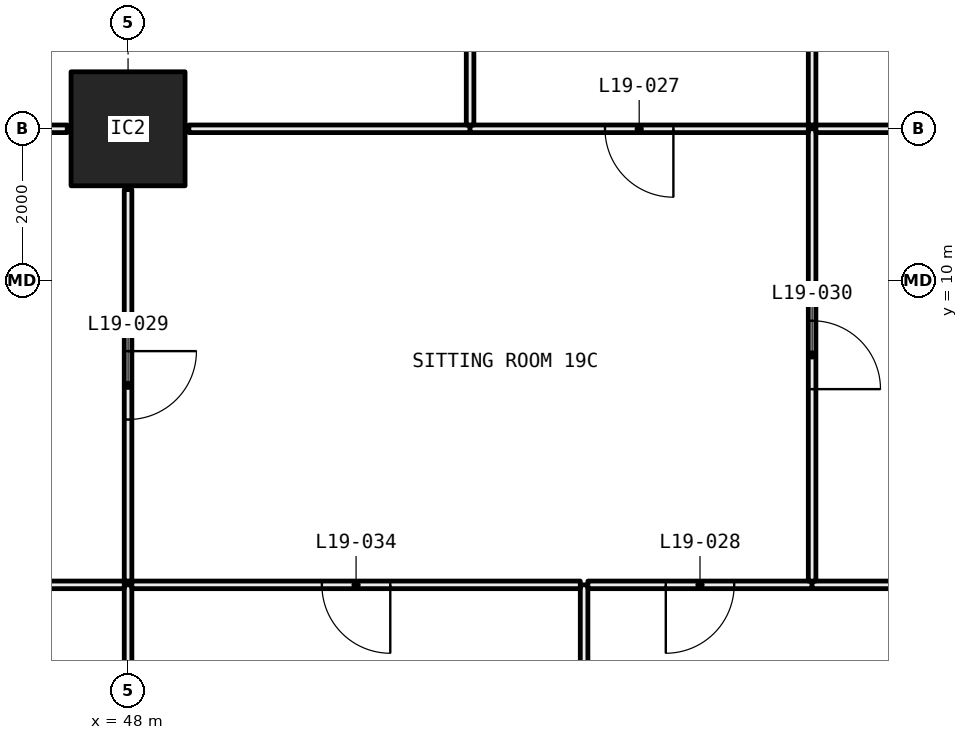
"""IFC4 building model, lengths in metres.
Left out: names, types, materials, properties, quantities, classifications, styles, units other than length and angle.
Written with IfcOpenShell. Run it as: python <this file> out.ifc"""

import sys

from ifc_helpers import new_model, si_unit, direction, frame, frame_2d, origin, origin_2d, place, context, subcontext, project, spatial, rectangle, hollow_rectangle, extrude, element, fill, save


model = new_model("IFC4")
c1 = context("Model", 3, precision=1e-05, world=origin(), true_north=direction((0.0, 1.0)))
c2 = subcontext(c1, "Body", "Model", "MODEL_VIEW")
j1 = project(units=[si_unit("LENGTHUNIT", "METRE"), si_unit("PLANEANGLEUNIT", "RADIAN")], contexts=[c1])
p1 = place(None, origin())
s1 = spatial("IfcSite", under=j1, at=p1, CompositionType="ELEMENT")
p2 = place(p1, origin())
s2 = spatial("IfcBuilding", under=s1, at=p2, CompositionType="ELEMENT")
p3 = place(p2, frame((0.0, 0.0, 78.3)))
s3 = spatial("IfcBuildingStorey", under=s2, at=p3, CompositionType="ELEMENT", Elevation=78.3)
p4 = place(p3, frame((48.0, 12.0, 0.0), z_axis=(0.0, 0.0, 1.0), x_axis=(1.0, 0.0, 0.0)))
e1 = element("IfcColumn", 1, at=p4, inside=s3, PredefinedType="COLUMN", context=c2, shape_type="SweptSolid", body=[
    extrude(hollow_rectangle(XDim=1.5, YDim=1.5, WallThickness=0.065, at=origin_2d()), origin(), (0.0, 0.0, 1.0), 3.05),
])
p5 = place(p3, frame((48.0, 0.72, 0.0), z_axis=(0.0, 0.0, 1.0), x_axis=(0.0, 1.0, 0.0)))
e2 = element("IfcWall", 2, at=p5, inside=s3, PredefinedType="PARTITIONING", context=c2, shape_type="SweptSolid", body=[
    extrude(rectangle(XDim=5.28, YDim=0.1, at=frame_2d((2.64, 0.0))), origin(), (0.0, 0.0, 1.0), 2.45),
])
p6 = place(p3, frame((47.95, 6.0, 0.0), z_axis=(0.0, 0.0, 1.0), x_axis=(-1.0, 0.0, 0.0)))
e3 = element("IfcWall", 3, at=p6, inside=s3, PredefinedType="PARTITIONING", context=c2, shape_type="SweptSolid", body=[
    extrude(rectangle(XDim=8.875, YDim=0.1, at=frame_2d((4.438, 0.0))), origin(), (0.0, 0.0, 1.0), 2.45),
])
p7 = place(p6, frame((3.988, 0.0, 0.0)))
e4 = element("IfcOpeningElement", 4, at=p7, cuts=e3, PredefinedType="OPENING", context=c2, shape_type="SweptSolid", body=[
    extrude(rectangle(XDim=0.9, YDim=2.1, at=frame_2d((0.45, 1.05))), frame((0.0, 0.06, 0.0), z_axis=(0.0, -1.0, 0.0), x_axis=(1.0, 0.0, 0.0)), (0.0, 0.0, 1.0), 0.12),
])
p8 = place(p3, frame((54.0, 0.72, 0.0), z_axis=(0.0, 0.0, 1.0), x_axis=(0.0, 1.0, 0.0)))
e5 = element("IfcWall", 5, at=p8, inside=s3, PredefinedType="PARTITIONING", context=c2, shape_type="SweptSolid", body=[
    extrude(rectangle(XDim=5.28, YDim=0.1, at=frame_2d((2.64, 0.0))), origin(), (0.0, 0.0, 1.0), 3.05),
])
p9 = place(p3, frame((53.95, 6.0, 0.0), z_axis=(0.0, 0.0, 1.0), x_axis=(-1.0, 0.0, 0.0)))
e6 = element("IfcWall", 6, at=p9, inside=s3, PredefinedType="PARTITIONING", context=c2, shape_type="SweptSolid", body=[
    extrude(rectangle(XDim=5.9, YDim=0.1, at=frame_2d((2.95, 0.0))), origin(), (0.0, 0.0, 1.0), 2.45),
])
p10 = place(p9, frame((2.5, 0.0, 0.0)))
e7 = element("IfcOpeningElement", 7, at=p10, cuts=e6, PredefinedType="OPENING", context=c2, shape_type="SweptSolid", body=[
    extrude(rectangle(XDim=0.9, YDim=2.1, at=frame_2d((0.45, 1.05))), frame((0.0, 0.06, 0.0), z_axis=(0.0, -1.0, 0.0), x_axis=(1.0, 0.0, 0.0)), (0.0, 0.0, 1.0), 0.12),
])
p11 = place(p3, frame((57.0, 6.0, 0.0), z_axis=(0.0, 0.0, 1.0), x_axis=(-1.0, 0.0, 0.0)))
e8 = element("IfcWall", 8, at=p11, inside=s3, PredefinedType="PARTITIONING", context=c2, shape_type="SweptSolid", body=[
    extrude(rectangle(XDim=2.95, YDim=0.1, at=frame_2d((1.475, 0.0))), origin(), (0.0, 0.0, 1.0), 3.05),
])
p12 = place(p11, frame((1.025, 0.0, 0.0)))
e9 = element("IfcOpeningElement", 9, at=p12, cuts=e8, PredefinedType="OPENING", context=c2, shape_type="SweptSolid", body=[
    extrude(rectangle(XDim=0.9, YDim=2.1, at=frame_2d((0.45, 1.05))), frame((0.0, 0.06, 0.0), z_axis=(0.0, -1.0, 0.0), x_axis=(1.0, 0.0, 0.0)), (0.0, 0.0, 1.0), 0.12),
])
p13 = place(p3, frame((59.95, 6.0, 0.0), z_axis=(0.0, 0.0, 1.0), x_axis=(-1.0, 0.0, 0.0)))
e10 = element("IfcWall", 10, at=p13, inside=s3, PredefinedType="PARTITIONING", context=c2, shape_type="SweptSolid", body=[
    extrude(rectangle(XDim=2.95, YDim=0.1, at=frame_2d((1.475, 0.0))), origin(), (0.0, 0.0, 1.0), 2.45),
])
p14 = place(p3, frame((48.0, 6.05, 0.0), z_axis=(0.0, 0.0, 1.0), x_axis=(0.0, 1.0, 0.0)))
e11 = element("IfcWall", 11, at=p14, inside=s3, PredefinedType="PARTITIONING", context=c2, shape_type="SweptSolid", body=[
    extrude(rectangle(XDim=5.15, YDim=0.1, at=frame_2d((2.575, 0.0))), origin(), (0.0, 0.0, 1.0), 2.45),
])
p15 = place(p14, frame((2.125, 0.0, 0.0)))
e12 = element("IfcOpeningElement", 12, at=p15, cuts=e11, PredefinedType="OPENING", context=c2, shape_type="SweptSolid", body=[
    extrude(rectangle(XDim=0.9, YDim=2.1, at=frame_2d((0.45, 1.05))), frame((0.0, 0.06, 0.0), z_axis=(0.0, -1.0, 0.0), x_axis=(1.0, 0.0, 0.0)), (0.0, 0.0, 1.0), 0.12),
])
p16 = place(p3, frame((47.2, 12.0, 0.0), z_axis=(0.0, 0.0, 1.0), x_axis=(-1.0, 0.0, 0.0)))
e13 = element("IfcWall", 13, at=p16, inside=s3, PredefinedType="PARTITIONING", context=c2, shape_type="SweptSolid", body=[
    extrude(rectangle(XDim=2.2, YDim=0.1, at=frame_2d((1.1, 0.0))), origin(), (0.0, 0.0, 1.0), 2.45),
])
p17 = place(p3, frame((57.0, 6.05, 0.0), z_axis=(0.0, 0.0, 1.0), x_axis=(0.0, 1.0, 0.0)))
e14 = element("IfcWall", 14, at=p17, inside=s3, PredefinedType="PARTITIONING", context=c2, shape_type="SweptSolid", body=[
    extrude(rectangle(XDim=5.95, YDim=0.1, at=frame_2d((2.975, 0.0))), origin(), (0.0, 0.0, 1.0), 2.45),
])
p18 = place(p17, frame((2.525, 0.0, 0.0)))
e15 = element("IfcOpeningElement", 15, at=p18, cuts=e14, PredefinedType="OPENING", context=c2, shape_type="SweptSolid", body=[
    extrude(rectangle(XDim=0.9, YDim=2.1, at=frame_2d((0.45, 1.05))), frame((0.0, 0.06, 0.0), z_axis=(0.0, -1.0, 0.0), x_axis=(1.0, 0.0, 0.0)), (0.0, 0.0, 1.0), 0.12),
])
p19 = place(p3, frame((52.5, 12.0, 0.0), z_axis=(0.0, 0.0, 1.0), x_axis=(-1.0, 0.0, 0.0)))
e16 = element("IfcWall", 16, at=p19, inside=s3, PredefinedType="PARTITIONING", context=c2, shape_type="SweptSolid", body=[
    extrude(rectangle(XDim=3.7, YDim=0.1, at=frame_2d((1.85, 0.0))), origin(), (0.0, 0.0, 1.0), 2.45),
])
p20 = place(p3, frame((56.95, 12.0, 0.0), z_axis=(0.0, 0.0, 1.0), x_axis=(-1.0, 0.0, 0.0)))
e17 = element("IfcWall", 17, at=p20, inside=s3, PredefinedType="PARTITIONING", context=c2, shape_type="SweptSolid", body=[
    extrude(rectangle(XDim=4.45, YDim=0.1, at=frame_2d((2.225, 0.0))), origin(), (0.0, 0.0, 1.0), 2.45),
])
p21 = place(p20, frame((1.775, 0.0, 0.0)))
e18 = element("IfcOpeningElement", 18, at=p21, cuts=e17, PredefinedType="OPENING", context=c2, shape_type="SweptSolid", body=[
    extrude(rectangle(XDim=0.9, YDim=2.1, at=frame_2d((0.45, 1.05))), frame((0.0, 0.06, 0.0), z_axis=(0.0, -1.0, 0.0), x_axis=(1.0, 0.0, 0.0)), (0.0, 0.0, 1.0), 0.12),
])
p22 = place(p3, frame((59.2, 12.0, 0.0), z_axis=(0.0, 0.0, 1.0), x_axis=(-1.0, 0.0, 0.0)))
e19 = element("IfcWall", 19, at=p22, inside=s3, PredefinedType="PARTITIONING", context=c2, shape_type="SweptSolid", body=[
    extrude(rectangle(XDim=2.15, YDim=0.1, at=frame_2d((1.075, 0.0))), origin(), (0.0, 0.0, 1.0), 2.45),
])
p23 = place(p3, frame((52.5, 12.05, 0.0), z_axis=(0.0, 0.0, 1.0), x_axis=(0.0, 1.0, 0.0)))
e20 = element("IfcWall", 20, at=p23, inside=s3, PredefinedType="PARTITIONING", context=c2, shape_type="SweptSolid", body=[
    extrude(rectangle(XDim=5.85, YDim=0.1, at=frame_2d((2.925, 0.0))), origin(), (0.0, 0.0, 1.0), 2.45),
])
p24 = place(p23, frame((2.475, 0.0, 0.0)))
e21 = element("IfcOpeningElement", 21, at=p24, cuts=e20, PredefinedType="OPENING", context=c2, shape_type="SweptSolid", body=[
    extrude(rectangle(XDim=0.9, YDim=2.1, at=frame_2d((0.45, 1.05))), frame((0.0, 0.06, 0.0), z_axis=(0.0, -1.0, 0.0), x_axis=(1.0, 0.0, 0.0)), (0.0, 0.0, 1.0), 0.12),
])
p25 = place(p3, frame((57.0, 12.05, 0.0), z_axis=(0.0, 0.0, 1.0), x_axis=(0.0, 1.0, 0.0)))
e22 = element("IfcWall", 22, at=p25, inside=s3, PredefinedType="PARTITIONING", context=c2, shape_type="SweptSolid", body=[
    extrude(rectangle(XDim=5.85, YDim=0.1, at=frame_2d((2.925, 0.0))), origin(), (0.0, 0.0, 1.0), 2.45),
])
p26 = place(p25, frame((2.475, 0.0, 0.0)))
e23 = element("IfcOpeningElement", 23, at=p26, cuts=e22, PredefinedType="OPENING", context=c2, shape_type="SweptSolid", body=[
    extrude(rectangle(XDim=0.9, YDim=2.1, at=frame_2d((0.45, 1.05))), frame((0.0, 0.06, 0.0), z_axis=(0.0, -1.0, 0.0), x_axis=(1.0, 0.0, 0.0)), (0.0, 0.0, 1.0), 0.12),
])
p27 = place(p21, origin())
e24 = element("IfcDoor", 24, at=p27, inside=s3, OperationType="SINGLE_SWING_RIGHT", PredefinedType="DOOR", context=c2, shape_type="SweptSolid", body=[
    extrude(rectangle(XDim=0.9, YDim=2.1, at=frame_2d((0.45, 1.05))), frame((0.0, 0.025, 0.0), z_axis=(0.0, -1.0, 0.0), x_axis=(1.0, 0.0, 0.0)), (0.0, 0.0, 1.0), 0.05),
])
fill(e18, e24)
p28 = place(p12, origin())
e25 = element("IfcDoor", 25, at=p28, inside=s3, OperationType="SINGLE_SWING_LEFT", PredefinedType="DOOR", context=c2, shape_type="SweptSolid", body=[
    extrude(rectangle(XDim=0.9, YDim=2.1, at=frame_2d((0.45, 1.05))), frame((0.0, 0.025, 0.0), z_axis=(0.0, -1.0, 0.0), x_axis=(1.0, 0.0, 0.0)), (0.0, 0.0, 1.0), 0.05),
])
fill(e9, e25)
p29 = place(p15, frame((0.9, 0.0, 0.0), x_axis=(-1.0, 0.0, 0.0)))
e26 = element("IfcDoor", 26, at=p29, inside=s3, OperationType="SINGLE_SWING_RIGHT", PredefinedType="DOOR", context=c2, shape_type="SweptSolid", body=[
    extrude(rectangle(XDim=0.9, YDim=2.1, at=frame_2d((0.45, 1.05))), frame((0.0, 0.025, 0.0), z_axis=(0.0, -1.0, 0.0), x_axis=(1.0, 0.0, 0.0)), (0.0, 0.0, 1.0), 0.05),
])
fill(e12, e26)
p30 = place(p18, frame((0.9, 0.0, 0.0), x_axis=(-1.0, 0.0, 0.0)))
e27 = element("IfcDoor", 27, at=p30, inside=s3, OperationType="SINGLE_SWING_LEFT", PredefinedType="DOOR", context=c2, shape_type="SweptSolid", body=[
    extrude(rectangle(XDim=0.9, YDim=2.1, at=frame_2d((0.45, 1.05))), frame((0.0, 0.025, 0.0), z_axis=(0.0, -1.0, 0.0), x_axis=(1.0, 0.0, 0.0)), (0.0, 0.0, 1.0), 0.05),
])
fill(e15, e27)
p31 = place(p10, origin())
e28 = element("IfcDoor", 28, at=p31, inside=s3, OperationType="SINGLE_SWING_RIGHT", PredefinedType="DOOR", context=c2, shape_type="SweptSolid", body=[
    extrude(rectangle(XDim=0.9, YDim=2.1, at=frame_2d((0.45, 1.05))), frame((0.0, 0.025, 0.0), z_axis=(0.0, -1.0, 0.0), x_axis=(1.0, 0.0, 0.0)), (0.0, 0.0, 1.0), 0.05),
])
fill(e7, e28)
save(model, sys.argv[1])
